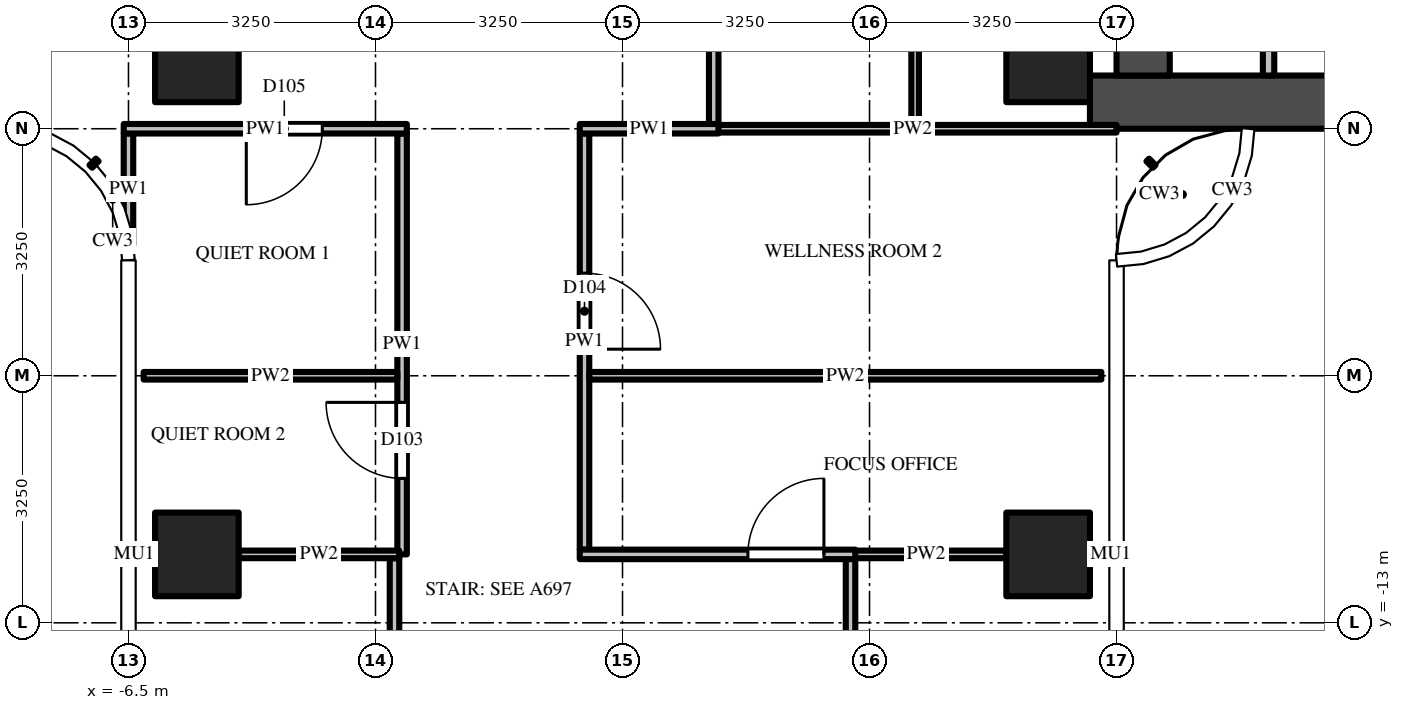
"""IFC4 building model, lengths in metres.
Left out: names, types, materials, properties, quantities, classifications, styles, units other than length and angle.
Written with IfcOpenShell. Run it as: python <this file> out.ifc"""

import sys

from ifc_helpers import new_model, si_unit, direction, frame, frame_2d, origin, origin_2d, place, context, subcontext, project, spatial, rectangle, extrude, source, transform, mapped, element, fill, save


model = new_model("IFC4")
c1 = context("Model", 3, precision=1e-05, world=origin(), true_north=direction((0.0, 1.0)))
c2 = subcontext(c1, "Body", "Model", "MODEL_VIEW")
j1 = project(units=[si_unit("LENGTHUNIT", "METRE"), si_unit("PLANEANGLEUNIT", "RADIAN")], contexts=[c1])
p1 = place(None, origin())
s1 = spatial("IfcSite", under=j1, at=p1, CompositionType="ELEMENT")
p2 = place(p1, origin())
s2 = spatial("IfcBuilding", under=s1, at=p2, CompositionType="ELEMENT")
p3 = place(p2, frame((0.0, 0.0, 255.8)))
s3 = spatial("IfcBuildingStorey", under=s2, at=p3, CompositionType="ELEMENT", Elevation=255.8)
m1 = source(origin(), c2, "Body", "SweptSolid", [
    extrude(rectangle(XDim=1.1, YDim=1.1, at=origin_2d()), origin(), (0.0, 0.0, 1.0), 3.9),
])
for number, where, z_axis, x_axis in (
    (1, (5.6, -5.6, 0.0), (0.0, 0.0, 1.0), (1.0, 0.0, 0.0)),
    (2, (-5.6, -5.6, 0.0), (0.0, 0.0, 1.0), (1.0, 0.0, 0.0)),
    (3, (5.6, -12.1, 0.0), (0.0, 0.0, 1.0), (1.0, 0.0, 0.0)),
    (4, (-5.6, -12.1, 0.0), (0.0, 0.0, 1.0), (1.0, 0.0, 0.0)),
):
    element("IfcColumn", number, at=place(p3, frame(where, z_axis=z_axis, x_axis=x_axis)), inside=s3, PredefinedType="COLUMN", context=c2, shape_type="MappedRepresentation", body=[
        mapped(m1, transform((0.0, 0.0, 0.0))),
    ])
m2 = source(origin(), c2, "Body", "SweptSolid", [
    extrude(rectangle(XDim=16.6, YDim=0.7, at=frame_2d((8.3, 0.0))), origin(), (0.0, 0.0, 1.0), 3.7),
])
p4 = place(p3, frame((6.15, -6.15, 0.0), z_axis=(0.0, 0.0, 1.0), x_axis=(1.0, 0.0, 0.0)))
e5 = element("IfcWall", 5, at=p4, inside=s3, PredefinedType="SHEAR", context=c2, shape_type="MappedRepresentation", body=[
    mapped(m2, transform((0.0, 0.0, 0.0))),
])
m3 = source(origin(), c2, "Body", "SweptSolid", [
    extrude(rectangle(XDim=9.05, YDim=0.7, at=frame_2d((4.525, 0.0))), origin(), (0.0, 0.0, 1.0), 3.7),
])
p5 = place(p3, frame((6.85, -5.8, 0.0), z_axis=(0.0, 0.0, 1.0), x_axis=(0.0, 1.0, 0.0)))
e6 = element("IfcWall", 6, at=p5, inside=s3, PredefinedType="SHEAR", context=c2, shape_type="MappedRepresentation", body=[
    mapped(m3, transform((0.0, 0.0, 0.0))),
])
m4 = source(origin(), c2, "Body", "SweptSolid", [
    extrude(rectangle(XDim=1.8, YDim=2.1, at=frame_2d((0.9, 1.05))), frame((0.0, 0.36, 0.0), z_axis=(0.0, -1.0, 0.0), x_axis=(1.0, 0.0, 0.0)), (0.0, 0.0, 1.0), 0.72),
])
p6 = place(p5, frame((3.15, 0.0, 0.0)))
e7 = element("IfcOpeningElement", 7, at=p6, cuts=e6, PredefinedType="OPENING", context=c2, shape_type="MappedRepresentation", body=[
    mapped(m4, transform((0.0, 0.0, 0.0))),
])
m5 = source(origin(), c2, "Body", "SweptSolid", [
    extrude(rectangle(XDim=2.2, YDim=0.15, at=frame_2d((1.1, 0.0))), origin(), (0.0, 0.0, 1.0), 3.7),
])
p7 = place(p3, frame((8.5, -5.8, 0.0), z_axis=(0.0, 0.0, 1.0), x_axis=(0.0, 1.0, 0.0)))
e8 = element("IfcWall", 8, at=p7, inside=s3, PredefinedType="PARTITIONING", context=c2, shape_type="MappedRepresentation", body=[
    mapped(m5, transform((0.0, 0.0, 0.0))),
])
m6 = source(origin(), c2, "Body", "SweptSolid", [
    extrude(rectangle(XDim=1.469, YDim=0.125, at=frame_2d((0.734, 0.0))), origin(), (0.0, 0.0, 1.0), 3.7),
])
p8 = place(p3, frame((-6.5, -6.562, 0.0), z_axis=(0.0, 0.0, 1.0), x_axis=(0.0, -1.0, 0.0)))
e9 = element("IfcWall", 9, at=p8, inside=s3, PredefinedType="PARTITIONING", context=c2, shape_type="MappedRepresentation", body=[
    mapped(m6, transform((0.0, 0.0, 0.0))),
])
m7 = source(origin(), c2, "Body", "SweptSolid", [
    extrude(rectangle(XDim=8.85, YDim=0.125, at=frame_2d((4.425, 0.0))), origin(), (0.0, 0.0, 1.0), 2.78),
])
p9 = place(p3, frame((-3.0, -21.0, 0.0), z_axis=(0.0, 0.0, 1.0), x_axis=(0.0, 1.0, 0.0)))
e10 = element("IfcWall", 10, at=p9, inside=s3, PredefinedType="PARTITIONING", context=c2, shape_type="MappedRepresentation", body=[
    mapped(m7, transform((0.0, 0.0, 0.0))),
])
m8 = source(origin(), c2, "Body", "SweptSolid", [
    extrude(rectangle(XDim=1.0, YDim=2.1, at=frame_2d((0.5, 1.05))), frame((0.0, 0.073, 0.0), z_axis=(0.0, -1.0, 0.0), x_axis=(1.0, 0.0, 0.0)), (0.0, 0.0, 1.0), 0.145),
])
p10 = place(p9, frame((1.85, 0.0, 0.0)))
e11 = element("IfcOpeningElement", 11, at=p10, cuts=e10, PredefinedType="OPENING", context=c2, shape_type="MappedRepresentation", body=[
    mapped(m8, transform((0.0, 0.0, 0.0))),
])
m9 = source(origin(), c2, "Body", "SweptSolid", [
    extrude(rectangle(XDim=5.538, YDim=0.125, at=frame_2d((2.769, 0.0))), origin(), (0.0, 0.0, 1.0), 2.997),
])
p11 = place(p3, frame((-2.9, -12.1, 0.0), z_axis=(0.0, 0.0, 1.0), x_axis=(0.0, 1.0, 0.0)))
e12 = element("IfcWall", 12, at=p11, inside=s3, PredefinedType="PARTITIONING", context=c2, shape_type="MappedRepresentation", body=[
    mapped(m9, transform((0.0, 0.0, 0.0))),
])
p12 = place(p11, frame((1.0, 0.0, 0.0)))
e13 = element("IfcOpeningElement", 13, at=p12, cuts=e12, PredefinedType="OPENING", context=c2, shape_type="MappedRepresentation", body=[
    mapped(m8, transform((0.0, 0.0, 0.0))),
])
m10 = source(origin(), c2, "Body", "SweptSolid", [
    extrude(rectangle(XDim=5.475, YDim=0.125, at=frame_2d((2.738, 0.0))), origin(), (0.0, 0.0, 1.0), 2.997),
])
p13 = place(p3, frame((-0.5, -6.562, 0.0), z_axis=(0.0, 0.0, 1.0), x_axis=(0.0, -1.0, 0.0)))
e14 = element("IfcWall", 14, at=p13, inside=s3, PredefinedType="PARTITIONING", context=c2, shape_type="MappedRepresentation", body=[
    mapped(m10, transform((0.0, 0.0, 0.0))),
])
p14 = place(p13, frame((1.837, 0.0, 0.0)))
e15 = element("IfcOpeningElement", 15, at=p14, cuts=e14, PredefinedType="OPENING", context=c2, shape_type="MappedRepresentation", body=[
    mapped(m8, transform((0.0, 0.0, 0.0))),
])
m11 = source(origin(), c2, "Body", "SweptSolid", [
    extrude(rectangle(XDim=3.137, YDim=0.125, at=frame_2d((1.569, 0.0))), origin(), (0.0, 0.0, 1.0), 2.997),
])
p15 = place(p3, frame((1.2, -3.312, 0.0), z_axis=(0.0, 0.0, 1.0), x_axis=(0.0, -1.0, 0.0)))
e16 = element("IfcWall", 16, at=p15, inside=s3, PredefinedType="PARTITIONING", context=c2, shape_type="MappedRepresentation", body=[
    mapped(m11, transform((0.0, 0.0, 0.0))),
])
m12 = source(origin(), c2, "Body", "SweptSolid", [
    extrude(rectangle(XDim=1.1, YDim=2.1, at=frame_2d((0.55, 1.05))), frame((0.0, 0.073, 0.0), z_axis=(0.0, -1.0, 0.0), x_axis=(1.0, 0.0, 0.0)), (0.0, 0.0, 1.0), 0.145),
])
p16 = place(p15, frame((0.288, 0.0, 0.0)))
e17 = element("IfcOpeningElement", 17, at=p16, cuts=e16, PredefinedType="OPENING", context=c2, shape_type="MappedRepresentation", body=[
    mapped(m12, transform((0.0, 0.0, 0.0))),
])
m13 = source(origin(), c2, "Body", "SweptSolid", [
    extrude(rectangle(XDim=8.788, YDim=0.125, at=frame_2d((4.394, 0.0))), origin(), (0.0, 0.0, 1.0), 2.78),
])
p17 = place(p3, frame((3.0, -12.15, 0.0), z_axis=(0.0, 0.0, 1.0), x_axis=(0.0, -1.0, 0.0)))
e18 = element("IfcWall", 18, at=p17, inside=s3, PredefinedType="PARTITIONING", context=c2, shape_type="MappedRepresentation", body=[
    mapped(m13, transform((0.0, 0.0, 0.0))),
])
m14 = source(origin(), c2, "Body", "SweptSolid", [
    extrude(rectangle(XDim=1.8, YDim=2.1, at=frame_2d((0.9, 1.05))), frame((0.0, 0.073, 0.0), z_axis=(0.0, -1.0, 0.0), x_axis=(1.0, 0.0, 0.0)), (0.0, 0.0, 1.0), 0.145),
])
p18 = place(p17, frame((5.2, 0.0, 0.0)))
e19 = element("IfcOpeningElement", 19, at=p18, cuts=e18, PredefinedType="OPENING", context=c2, shape_type="MappedRepresentation", body=[
    mapped(m14, transform((0.0, 0.0, 0.0))),
])
m15 = source(origin(), c2, "Body", "SweptSolid", [
    extrude(rectangle(XDim=3.137, YDim=0.1, at=frame_2d((1.569, 0.0))), origin(), (0.0, 0.0, 1.0), 2.997),
])
p19 = place(p3, frame((3.85, -6.45, 0.0), z_axis=(0.0, 0.0, 1.0), x_axis=(0.0, 1.0, 0.0)))
e20 = element("IfcWall", 20, at=p19, inside=s3, PredefinedType="PARTITIONING", context=c2, shape_type="MappedRepresentation", body=[
    mapped(m15, transform((0.0, 0.0, 0.0))),
])
m16 = source(origin(), c2, "Body", "SweptSolid", [
    extrude(rectangle(XDim=2.113, YDim=0.1, at=frame_2d((1.056, 0.0))), origin(), (0.0, 0.0, 1.0), 2.997),
])
for number, where, z_axis, x_axis in (
    (21, (-5.05, -12.1, 0.0), (0.0, 0.0, 1.0), (1.0, 0.0, 0.0)),
    (22, (2.938, -12.1, 0.0), (0.0, 0.0, 1.0), (1.0, 0.0, 0.0)),
):
    element("IfcWall", number, at=place(p3, frame(where, z_axis=z_axis, x_axis=x_axis)), inside=s3, PredefinedType="PARTITIONING", context=c2, shape_type="MappedRepresentation", body=[
        mapped(m16, transform((0.0, 0.0, 0.0))),
    ])
m17 = source(origin(), c2, "Body", "SweptSolid", [
    extrude(rectangle(XDim=3.625, YDim=0.125, at=frame_2d((1.812, 0.0))), origin(), (0.0, 0.0, 1.0), 2.997),
])
p20 = place(p3, frame((-0.562, -12.1, 0.0), z_axis=(0.0, 0.0, 1.0), x_axis=(1.0, 0.0, 0.0)))
e23 = element("IfcWall", 23, at=p20, inside=s3, PredefinedType="PARTITIONING", context=c2, shape_type="MappedRepresentation", body=[
    mapped(m17, transform((0.0, 0.0, 0.0))),
])
p21 = place(p20, frame((2.212, 0.0, 0.0)))
e24 = element("IfcOpeningElement", 24, at=p21, cuts=e23, PredefinedType="OPENING", context=c2, shape_type="MappedRepresentation", body=[
    mapped(m8, transform((0.0, 0.0, 0.0))),
])
m18 = source(origin(), c2, "Body", "SweptSolid", [
    extrude(rectangle(XDim=3.338, YDim=0.1, at=frame_2d((1.669, 0.0))), origin(), (0.0, 0.0, 1.0), 2.78),
])
p22 = place(p3, frame((-6.3, -9.75, 0.0), z_axis=(0.0, 0.0, 1.0), x_axis=(1.0, 0.0, 0.0)))
e25 = element("IfcWall", 25, at=p22, inside=s3, PredefinedType="PARTITIONING", context=c2, shape_type="MappedRepresentation", body=[
    mapped(m18, transform((0.0, 0.0, 0.0))),
])
m19 = source(origin(), c2, "Body", "SweptSolid", [
    extrude(rectangle(XDim=6.738, YDim=0.1, at=frame_2d((3.369, 0.0))), origin(), (0.0, 0.0, 1.0), 2.78),
])
p23 = place(p3, frame((-0.438, -9.75, 0.0), z_axis=(0.0, 0.0, 1.0), x_axis=(1.0, 0.0, 0.0)))
e26 = element("IfcWall", 26, at=p23, inside=s3, PredefinedType="PARTITIONING", context=c2, shape_type="MappedRepresentation", body=[
    mapped(m19, transform((0.0, 0.0, 0.0))),
])
m20 = source(origin(), c2, "Body", "SweptSolid", [
    extrude(rectangle(XDim=5.363, YDim=0.1, at=frame_2d((2.681, 0.0))), origin(), (0.0, 0.0, 1.0), 2.78),
])
p24 = place(p3, frame((1.137, -6.5, 0.0), z_axis=(0.0, 0.0, 1.0), x_axis=(1.0, 0.0, 0.0)))
e27 = element("IfcWall", 27, at=p24, inside=s3, PredefinedType="PARTITIONING", context=c2, shape_type="MappedRepresentation", body=[
    mapped(m20, transform((0.0, 0.0, 0.0))),
])
m21 = source(origin(), c2, "Body", "SweptSolid", [
    extrude(rectangle(XDim=3.725, YDim=0.125, at=frame_2d((1.863, 0.0))), origin(), (0.0, 0.0, 1.0), 2.78),
])
p25 = place(p3, frame((-2.837, -6.5, 0.0), z_axis=(0.0, 0.0, 1.0), x_axis=(-1.0, 0.0, 0.0)))
e28 = element("IfcWall", 28, at=p25, inside=s3, PredefinedType="PARTITIONING", context=c2, shape_type="MappedRepresentation", body=[
    mapped(m21, transform((0.0, 0.0, 0.0))),
])
p26 = place(p25, frame((1.113, 0.0, 0.0)))
e29 = element("IfcOpeningElement", 29, at=p26, cuts=e28, PredefinedType="OPENING", context=c2, shape_type="MappedRepresentation", body=[
    mapped(m8, transform((0.0, 0.0, 0.0))),
])
m22 = source(origin(), c2, "Body", "SweptSolid", [
    extrude(rectangle(XDim=1.825, YDim=0.125, at=frame_2d((0.913, 0.0))), origin(), (0.0, 0.0, 1.0), 3.7),
])
p27 = place(p3, frame((1.262, -6.5, 0.0), z_axis=(0.0, 0.0, 1.0), x_axis=(-1.0, 0.0, 0.0)))
e30 = element("IfcWall", 30, at=p27, inside=s3, PredefinedType="PARTITIONING", context=c2, shape_type="MappedRepresentation", body=[
    mapped(m22, transform((0.0, 0.0, 0.0))),
])
m23 = source(origin(), c2, "Body", "SweptSolid", [
    extrude(rectangle(XDim=1.0, YDim=2.1, at=frame_2d((0.5, 1.05))), frame((0.0, 0.025, 0.0), z_axis=(0.0, -1.0, 0.0), x_axis=(1.0, 0.0, 0.0)), (0.0, 0.0, 1.0), 0.05),
])
p28 = place(p21, origin())
e31 = element("IfcDoor", 31, at=p28, inside=s3, OperationType="SINGLE_SWING_RIGHT", PredefinedType="DOOR", context=c2, shape_type="MappedRepresentation", body=[
    mapped(m23, transform((0.0, 0.0, 0.0))),
])
fill(e24, e31)
p29 = place(p12, origin())
e32 = element("IfcDoor", 32, at=p29, inside=s3, OperationType="SINGLE_SWING_RIGHT", PredefinedType="DOOR", context=c2, shape_type="MappedRepresentation", body=[
    mapped(m23, transform((0.0, 0.0, 0.0))),
])
fill(e13, e32)
p30 = place(p14, origin())
e33 = element("IfcDoor", 33, at=p30, inside=s3, OperationType="SINGLE_SWING_RIGHT", PredefinedType="DOOR", context=c2, shape_type="MappedRepresentation", body=[
    mapped(m23, transform((0.0, 0.0, 0.0))),
])
fill(e15, e33)
p31 = place(p26, origin())
e34 = element("IfcDoor", 34, at=p31, inside=s3, OperationType="SINGLE_SWING_RIGHT", PredefinedType="DOOR", context=c2, shape_type="MappedRepresentation", body=[
    mapped(m23, transform((0.0, 0.0, 0.0))),
])
fill(e29, e34)
save(model, sys.argv[1])
